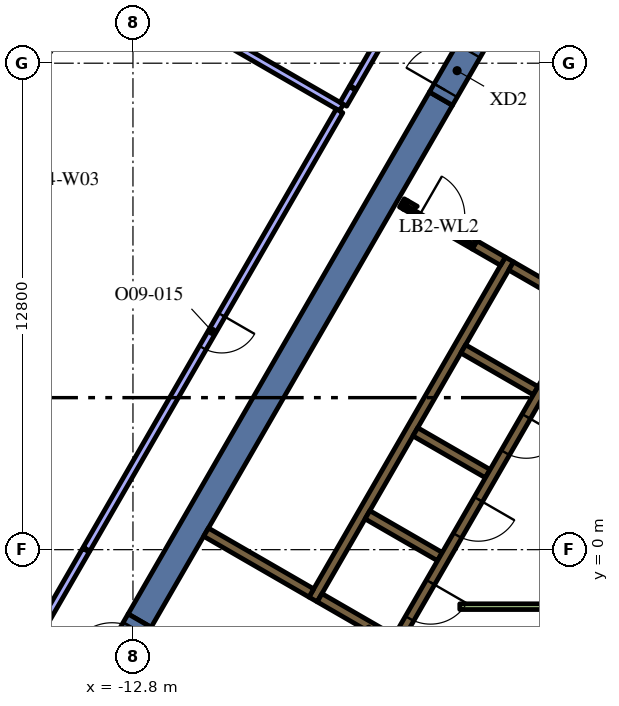
"""IFC4 building model, lengths in metres.
Left out: names, types, materials, properties, quantities, classifications, styles, units other than length and angle.
Written with IfcOpenShell. Run it as: python <this file> out.ifc"""

import sys

from ifc_helpers import new_model, si_unit, direction, frame, frame_2d, origin, place, context, subcontext, project, spatial, polyline, rectangle, outline, extrude, element, fill, save


model = new_model("IFC4")
c1 = context("Model", 3, precision=1e-05, world=origin(), true_north=direction((0.0, 1.0)))
c2 = subcontext(c1, "Body", "Model", "MODEL_VIEW")
j1 = project(units=[si_unit("LENGTHUNIT", "METRE"), si_unit("PLANEANGLEUNIT", "RADIAN")], contexts=[c1])
p1 = place(None, origin())
s1 = spatial("IfcSite", under=j1, at=p1, CompositionType="ELEMENT")
p2 = place(p1, origin())
s2 = spatial("IfcBuilding", under=s1, at=p2, CompositionType="ELEMENT")
p3 = place(p2, frame((0.0, 0.0, 243.6)))
s3 = spatial("IfcBuildingStorey", under=s2, at=p3, CompositionType="ELEMENT", Elevation=243.6)
p4 = place(p3, frame((-12.625, -1.867, 0.0), z_axis=(0.0, 0.0, 1.0), x_axis=(0.499996974394, 0.866027150612, 0.0)))
e1 = element("IfcWall", 1, at=p4, inside=s3, PredefinedType="SOLIDWALL", context=c2, shape_type="SweptSolid", body=[
    extrude(rectangle(XDim=15.858, YDim=0.7, at=frame_2d((7.929, 0.0))), origin(), (0.0, 0.0, 1.0), 4.2),
])
p5 = place(p3, frame((-8.06, -1.311, 0.0), z_axis=(0.0, 0.0, 1.0), x_axis=(0.50000273126, 0.866023826885, 0.0)))
e2 = element("IfcWall", 2, at=p5, inside=s3, PredefinedType="SOLIDWALL", context=c2, shape_type="SweptSolid", body=[
    extrude(rectangle(XDim=10.33, YDim=0.25, at=frame_2d((5.165, 0.0))), origin(), (0.0, 0.0, 1.0), 4.2),
])
p6 = place(p3, frame((-1.76, 6.836, 0.0), z_axis=(0.0, 0.0, 1.0), x_axis=(-0.865952863304, 0.500125622755, 0.0)))
e3 = element("IfcWall", 3, at=p6, inside=s3, PredefinedType="SOLIDWALL", context=c2, shape_type="SweptSolid", body=[
    extrude(rectangle(XDim=1.258, YDim=0.25, at=frame_2d((0.629, 0.0))), origin(), (0.0, 0.0, 1.0), 4.2),
])
for number, where, z_axis, x_axis in (
    (4, (-2.204, 4.182, 0.0), (0.0, 0.0, 1.0), (-0.866, 0.5, 0.0)),
    (5, (-5.369, 3.1, 0.0), (0.0, 0.0, 1.0), (0.866, -0.5, 0.0)),
    (6, (-4.724, -0.182, 0.0), (0.0, 0.0, 1.0), (-0.866, 0.5, 0.0)),
):
    element("IfcWall", number, at=place(p3, frame(where, z_axis=z_axis, x_axis=x_axis)), inside=s3, PredefinedType="SOLIDWALL", context=c2, shape_type="SweptSolid", body=[
        extrude(rectangle(XDim=2.2, YDim=0.25, at=frame_2d((1.1, 0.0))), origin(), (0.0, 0.0, 1.0), 4.2),
    ])
p7 = place(p3, origin())
e7 = element("IfcWall", 7, at=p7, inside=s3, PredefinedType="SOLIDWALL", context=c2, shape_type="SweptSolid", body=[
    extrude(outline(polyline([(-5.922, -2.257), (-5.922, -2.257), (-5.705, -2.382), (-5.83, -2.598), (-6.483, -2.221), (-6.591, -2.033), (-6.591, -2.033), (-6.7, -2.096), (-7.952, -1.373), (-7.827, -1.156), (-5.922, -2.257)])), origin(), (0.0, 0.0, 1.0), 4.2),
])
p8 = place(p3, frame((-8.106, -1.14, 0.0), z_axis=(0.0, 0.0, 1.0), x_axis=(-0.866008981251, 0.500028443584, 0.0)))
e8 = element("IfcWall", 8, at=p8, inside=s3, PredefinedType="SOLIDWALL", context=c2, shape_type="SweptSolid", body=[
    extrude(rectangle(XDim=3.2, YDim=0.25, at=frame_2d((1.6, 0.0))), origin(), (0.0, 0.0, 1.0), 4.2),
])
p9 = place(p3, frame((-5.725, 9.125, 0.0), z_axis=(0.0, 0.0, 1.0), x_axis=(0.866185586049, -0.49972245349, 0.0)))
e9 = element("IfcWall", 9, at=p9, inside=s3, PredefinedType="SOLIDWALL", context=c2, shape_type="SweptSolid", body=[
    extrude(rectangle(XDim=0.11, YDim=0.25, at=frame_2d((0.055, 0.0))), origin(), (0.0, 0.0, 1.0), 4.2),
])
p10 = place(p3, frame((-3.066, 7.59, 0.0), z_axis=(0.0, 0.0, 1.0), x_axis=(-0.866081358704, 0.49990307071, 0.0)))
e10 = element("IfcWall", 10, at=p10, inside=s3, PredefinedType="SOLIDWALL", context=c2, shape_type="SweptSolid", body=[
    extrude(rectangle(XDim=0.858, YDim=0.25, at=frame_2d((0.429, 0.0))), origin(), (0.0, 0.0, 1.0), 4.2),
])
e11 = element("IfcWall", 11, at=p7, inside=s3, PredefinedType="SOLIDWALL", context=c2, shape_type="SweptSolid", body=[
    extrude(outline(polyline([(-3.748, 8.128), (-3.813, 8.015), (-4.027, 8.139), (-4.017, 8.156), (-4.008, 8.173), (-4.0, 8.192), (-3.995, 8.21), (-3.991, 8.23), (-3.99, 8.25), (-3.99, 8.268), (-3.748, 8.128)])), origin(), (0.0, 0.0, 1.0), 4.2),
])
e12 = element("IfcWall", 12, at=p7, inside=s3, PredefinedType="SOLIDWALL", context=c2, shape_type="SweptSolid", body=[
    extrude(outline(polyline([(-5.689, 8.96), (-5.69, 8.961), (-5.565, 9.177), (-5.319, 9.035), (-5.335, 9.026), (-5.351, 9.015), (-5.366, 9.002), (-5.379, 8.988), (-5.392, 8.972), (-5.402, 8.956), (-5.412, 8.939), (-5.629, 9.064), (-5.629, 9.064), (-5.689, 8.96)])), origin(), (0.0, 0.0, 1.0), 4.2),
])
p11 = place(p3, frame((-4.2, -1.5, 0.0), z_axis=(0.0, 0.0, 1.0), x_axis=(1.0, 0.0, 0.0)))
e13 = element("IfcWall", 13, at=p11, inside=s3, PredefinedType="PARTITIONING", context=c2, shape_type="SweptSolid", body=[
    extrude(rectangle(XDim=9.359, YDim=0.15, at=frame_2d((4.68, 0.0))), origin(), (0.0, 0.0, 1.0), 3.45),
])
p12 = place(p3, frame((-0.898, 6.194, 0.0), z_axis=(0.0, 0.0, 1.0), x_axis=(-0.499996202215, -0.866027596426, 0.0)))
e14 = element("IfcWall", 14, at=p12, inside=s3, PredefinedType="SOLIDWALL", context=c2, shape_type="SweptSolid", body=[
    extrude(rectangle(XDim=9.83, YDim=0.25, at=frame_2d((4.915, 0.0))), origin(), (0.0, 0.0, 1.0), 4.2),
])
p13 = place(p12, frame((0.585, 0.0, 0.0)))
e15 = element("IfcOpeningElement", 15, at=p13, cuts=e14, PredefinedType="OPENING", context=c2, shape_type="SweptSolid", body=[
    extrude(rectangle(XDim=1.1, YDim=2.1, at=frame_2d((0.55, 1.05))), frame((0.0, 0.135, 0.0), z_axis=(0.0, -1.0, 0.0), x_axis=(1.0, 0.0, 0.0)), (0.0, 0.0, 1.0), 0.27),
])
p14 = place(p12, frame((3.105, 0.0, 0.0)))
e16 = element("IfcOpeningElement", 16, at=p14, cuts=e14, PredefinedType="OPENING", context=c2, shape_type="SweptSolid", body=[
    extrude(rectangle(XDim=1.1, YDim=2.1, at=frame_2d((0.55, 1.05))), frame((0.0, 0.135, 0.0), z_axis=(0.0, -1.0, 0.0), x_axis=(1.0, 0.0, 0.0)), (0.0, 0.0, 1.0), 0.27),
])
p15 = place(p12, frame((5.625, 0.0, 0.0)))
e17 = element("IfcOpeningElement", 17, at=p15, cuts=e14, PredefinedType="OPENING", context=c2, shape_type="SweptSolid", body=[
    extrude(rectangle(XDim=1.1, YDim=2.1, at=frame_2d((0.55, 1.05))), frame((0.0, 0.135, 0.0), z_axis=(0.0, -1.0, 0.0), x_axis=(1.0, 0.0, 0.0)), (0.0, 0.0, 1.0), 0.27),
])
p16 = place(p12, frame((8.145, 0.0, 0.0)))
e18 = element("IfcOpeningElement", 18, at=p16, cuts=e14, PredefinedType="OPENING", context=c2, shape_type="SweptSolid", body=[
    extrude(rectangle(XDim=1.1, YDim=2.1, at=frame_2d((0.55, 1.05))), frame((0.0, 0.135, 0.0), z_axis=(0.0, -1.0, 0.0), x_axis=(1.0, 0.0, 0.0)), (0.0, 0.0, 1.0), 0.27),
])
p17 = place(p3, frame((-5.659, 9.012, 0.0), z_axis=(0.0, 0.0, 1.0), x_axis=(0.866009402589, -0.500027713859, 0.0)))
e19 = element("IfcWall", 19, at=p17, inside=s3, PredefinedType="PARTITIONING", context=c2, shape_type="SweptSolid", body=[
    extrude(rectangle(XDim=2.1, YDim=0.12, at=frame_2d((1.05, 0.0))), origin(), (0.0, 0.0, 1.0), 3.45),
])
p18 = place(p17, frame((0.45, 0.0, 0.0)))
e20 = element("IfcOpeningElement", 20, at=p18, cuts=e19, PredefinedType="OPENING", context=c2, shape_type="SweptSolid", body=[
    extrude(rectangle(XDim=1.2, YDim=2.1, at=frame_2d((0.6, 1.05))), frame((0.0, 0.07, 0.0), z_axis=(0.0, -1.0, 0.0), x_axis=(1.0, 0.0, 0.0)), (0.0, 0.0, 1.0), 0.14),
])
p19 = place(p3, frame((-4.696, 11.867, 0.0), z_axis=(0.0, 0.0, 1.0), x_axis=(0.499892348375, 0.866087547558, 0.0)))
e21 = element("IfcWall", 21, at=p19, inside=s3, PredefinedType="SOLIDWALL", context=c2, shape_type="SweptSolid", body=[
    extrude(rectangle(XDim=1.7, YDim=0.7, at=frame_2d((0.85, 0.0))), origin(), (0.0, 0.0, 1.0), 4.2),
])
p20 = place(p19, frame((0.25, 0.0, 0.0)))
e22 = element("IfcOpeningElement", 22, at=p20, cuts=e21, PredefinedType="OPENING", context=c2, shape_type="SweptSolid", body=[
    extrude(rectangle(XDim=1.2, YDim=2.1, at=frame_2d((0.6, 1.05))), frame((0.0, 0.36, 0.0), z_axis=(0.0, -1.0, 0.0), x_axis=(1.0, 0.0, 0.0)), (0.0, 0.0, 1.0), 0.72),
])
p21 = place(p3, frame((-13.475, -3.339, 0.0), z_axis=(0.0, 0.0, 1.0), x_axis=(0.499954529098, 0.86605165483, 0.0)))
e23 = element("IfcWall", 23, at=p21, inside=s3, PredefinedType="SOLIDWALL", context=c2, shape_type="SweptSolid", body=[
    extrude(rectangle(XDim=1.7, YDim=0.7, at=frame_2d((0.85, 0.0))), origin(), (0.0, 0.0, 1.0), 4.2),
])
p22 = place(p21, frame((0.25, 0.0, 0.0)))
e24 = element("IfcOpeningElement", 24, at=p22, cuts=e23, PredefinedType="OPENING", context=c2, shape_type="SweptSolid", body=[
    extrude(rectangle(XDim=1.2, YDim=2.1, at=frame_2d((0.6, 1.05))), frame((0.0, 0.36, 0.0), z_axis=(0.0, -1.0, 0.0), x_axis=(1.0, 0.0, 0.0)), (0.0, 0.0, 1.0), 0.72),
])
p23 = place(p3, frame((-7.314, 11.632, 0.0), z_axis=(0.0, 0.0, 1.0), x_axis=(-0.8660128559, 0.500021732944, 0.0)))
e25 = element("IfcWall", 25, at=p23, inside=s3, PredefinedType="PARTITIONING", context=c2, shape_type="SweptSolid", body=[
    extrude(rectangle(XDim=3.625, YDim=0.2, at=frame_2d((1.812, 0.0))), origin(), (0.0, 0.0, 1.0), 3.45),
])
p24 = place(p3, frame((-7.022, 12.137, 0.0), z_axis=(0.0, 0.0, 1.0), x_axis=(-0.500159754115, -0.865933150054, 0.0)))
e26 = element("IfcWall", 26, at=p24, inside=s3, PredefinedType="PARTITIONING", context=c2, shape_type="SweptSolid", body=[
    extrude(rectangle(XDim=0.483, YDim=0.2, at=frame_2d((0.242, 0.0))), origin(), (0.0, 0.0, 1.0), 3.45),
])
p25 = place(p3, frame((-3.364, 18.474, 0.0), z_axis=(0.0, 0.0, 1.0), x_axis=(-0.499987324581, -0.866032721818, 0.0)))
e27 = element("IfcWall", 27, at=p25, inside=s3, PredefinedType="PARTITIONING", context=c2, shape_type="SweptSolid", body=[
    extrude(rectangle(XDim=7.287, YDim=0.2, at=frame_2d((3.644, 0.0))), origin(), (0.0, 0.0, 1.0), 3.45),
])
p26 = place(p25, frame((3.1, 0.0, 0.0)))
e28 = element("IfcOpeningElement", 28, at=p26, cuts=e27, PredefinedType="OPENING", context=c2, shape_type="SweptSolid", body=[
    extrude(rectangle(XDim=1.0, YDim=2.1, at=frame_2d((0.5, 1.05))), frame((0.0, 0.11, 0.0), z_axis=(0.0, -1.0, 0.0), x_axis=(1.0, 0.0, 0.0)), (0.0, 0.0, 1.0), 0.22),
])
p27 = place(p3, frame((-7.364, 11.545, 0.0), z_axis=(0.0, 0.0, 1.0), x_axis=(-0.500001759768, -0.86602438778, 0.0)))
e29 = element("IfcWall", 29, at=p27, inside=s3, PredefinedType="PARTITIONING", context=c2, shape_type="SweptSolid", body=[
    extrude(rectangle(XDim=13.317, YDim=0.2, at=frame_2d((6.658, 0.0))), origin(), (0.0, 0.0, 1.0), 3.45),
])
p28 = place(p27, frame((6.2, 0.0, 0.0)))
e30 = element("IfcOpeningElement", 30, at=p28, cuts=e29, PredefinedType="OPENING", context=c2, shape_type="SweptSolid", body=[
    extrude(rectangle(XDim=1.0, YDim=2.1, at=frame_2d((0.5, 1.05))), frame((0.0, 0.11, 0.0), z_axis=(0.0, -1.0, 0.0), x_axis=(1.0, 0.0, 0.0)), (0.0, 0.0, 1.0), 0.22),
])
p29 = place(p3, frame((-14.037, -0.013, 0.0), z_axis=(0.0, 0.0, 1.0), x_axis=(-0.500018205831, -0.866014892388, 0.0)))
e31 = element("IfcWall", 31, at=p29, inside=s3, PredefinedType="PARTITIONING", context=c2, shape_type="SweptSolid", body=[
    extrude(rectangle(XDim=5.693, YDim=0.2, at=frame_2d((2.846, 0.0))), origin(), (0.0, 0.0, 1.0), 3.45),
])
p30 = place(p3, frame((-14.038, 14.864, 0.0), z_axis=(0.0, 0.0, 1.0), x_axis=(-0.517846166225, -0.855473756538, 0.0)))
e32 = element("IfcWall", 32, at=p30, inside=s3, PredefinedType="SOLIDWALL", context=c2, shape_type="SweptSolid", body=[
    extrude(rectangle(XDim=5.298, YDim=0.24, at=frame_2d((2.649, 0.0))), origin(), (0.0, 0.0, 1.0), 3.95),
])
p31 = place(p30, frame((0.294, 0.0, 0.9)))
e33 = element("IfcOpeningElement", 33, at=p31, cuts=e32, PredefinedType="OPENING", context=c2, shape_type="SweptSolid", body=[
    extrude(rectangle(XDim=1.5, YDim=2.55, at=frame_2d((0.75, 1.275))), frame((0.0, 0.13, 0.0), z_axis=(0.0, -1.0, 0.0), x_axis=(1.0, 0.0, 0.0)), (0.0, 0.0, 1.0), 0.26),
])
p32 = place(p30, frame((3.504, 0.0, 0.9)))
e34 = element("IfcOpeningElement", 34, at=p32, cuts=e32, PredefinedType="OPENING", context=c2, shape_type="SweptSolid", body=[
    extrude(rectangle(XDim=1.5, YDim=2.55, at=frame_2d((0.75, 1.275))), frame((0.0, 0.13, 0.0), z_axis=(0.0, -1.0, 0.0), x_axis=(1.0, 0.0, 0.0)), (0.0, 0.0, 1.0), 0.26),
])
p33 = place(p14, origin())
e35 = element("IfcDoor", 35, at=p33, inside=s3, OperationType="DOUBLE_DOOR_SLIDING", PredefinedType="DOOR", context=c2, shape_type="SweptSolid", body=[
    extrude(rectangle(XDim=1.1, YDim=2.1, at=frame_2d((0.55, 1.05))), frame((0.0, 0.025, 0.0), z_axis=(0.0, -1.0, 0.0), x_axis=(1.0, 0.0, 0.0)), (0.0, 0.0, 1.0), 0.05),
])
fill(e16, e35)
p34 = place(p15, origin())
e36 = element("IfcDoor", 36, at=p34, inside=s3, OperationType="DOUBLE_DOOR_SLIDING", PredefinedType="DOOR", context=c2, shape_type="SweptSolid", body=[
    extrude(rectangle(XDim=1.1, YDim=2.1, at=frame_2d((0.55, 1.05))), frame((0.0, 0.025, 0.0), z_axis=(0.0, -1.0, 0.0), x_axis=(1.0, 0.0, 0.0)), (0.0, 0.0, 1.0), 0.05),
])
fill(e17, e36)
p35 = place(p16, origin())
e37 = element("IfcDoor", 37, at=p35, inside=s3, OperationType="DOUBLE_DOOR_SLIDING", PredefinedType="DOOR", context=c2, shape_type="SweptSolid", body=[
    extrude(rectangle(XDim=1.1, YDim=2.1, at=frame_2d((0.55, 1.05))), frame((0.0, 0.025, 0.0), z_axis=(0.0, -1.0, 0.0), x_axis=(1.0, 0.0, 0.0)), (0.0, 0.0, 1.0), 0.05),
])
fill(e18, e37)
p36 = place(p18, origin())
e38 = element("IfcDoor", 38, at=p36, inside=s3, OperationType="SINGLE_SWING_LEFT", PredefinedType="DOOR", context=c2, shape_type="SweptSolid", body=[
    extrude(rectangle(XDim=1.2, YDim=2.1, at=frame_2d((0.6, 1.05))), frame((0.0, 0.025, 0.0), z_axis=(0.0, -1.0, 0.0), x_axis=(1.0, 0.0, 0.0)), (0.0, 0.0, 1.0), 0.05),
])
fill(e20, e38)
p37 = place(p20, origin())
e39 = element("IfcDoor", 39, at=p37, inside=s3, OperationType="SINGLE_SWING_LEFT", PredefinedType="DOOR", context=c2, shape_type="SweptSolid", body=[
    extrude(rectangle(XDim=1.2, YDim=2.1, at=frame_2d((0.6, 1.05))), frame((0.0, 0.025, 0.0), z_axis=(0.0, -1.0, 0.0), x_axis=(1.0, 0.0, 0.0)), (0.0, 0.0, 1.0), 0.05),
])
fill(e22, e39)
p38 = place(p28, origin())
e40 = element("IfcDoor", 40, at=p38, inside=s3, OperationType="SINGLE_SWING_RIGHT", PredefinedType="DOOR", context=c2, shape_type="SweptSolid", body=[
    extrude(rectangle(XDim=1.0, YDim=2.1, at=frame_2d((0.5, 1.05))), frame((0.0, 0.025, 0.0), z_axis=(0.0, -1.0, 0.0), x_axis=(1.0, 0.0, 0.0)), (0.0, 0.0, 1.0), 0.05),
])
fill(e30, e40)
save(model, sys.argv[1])
